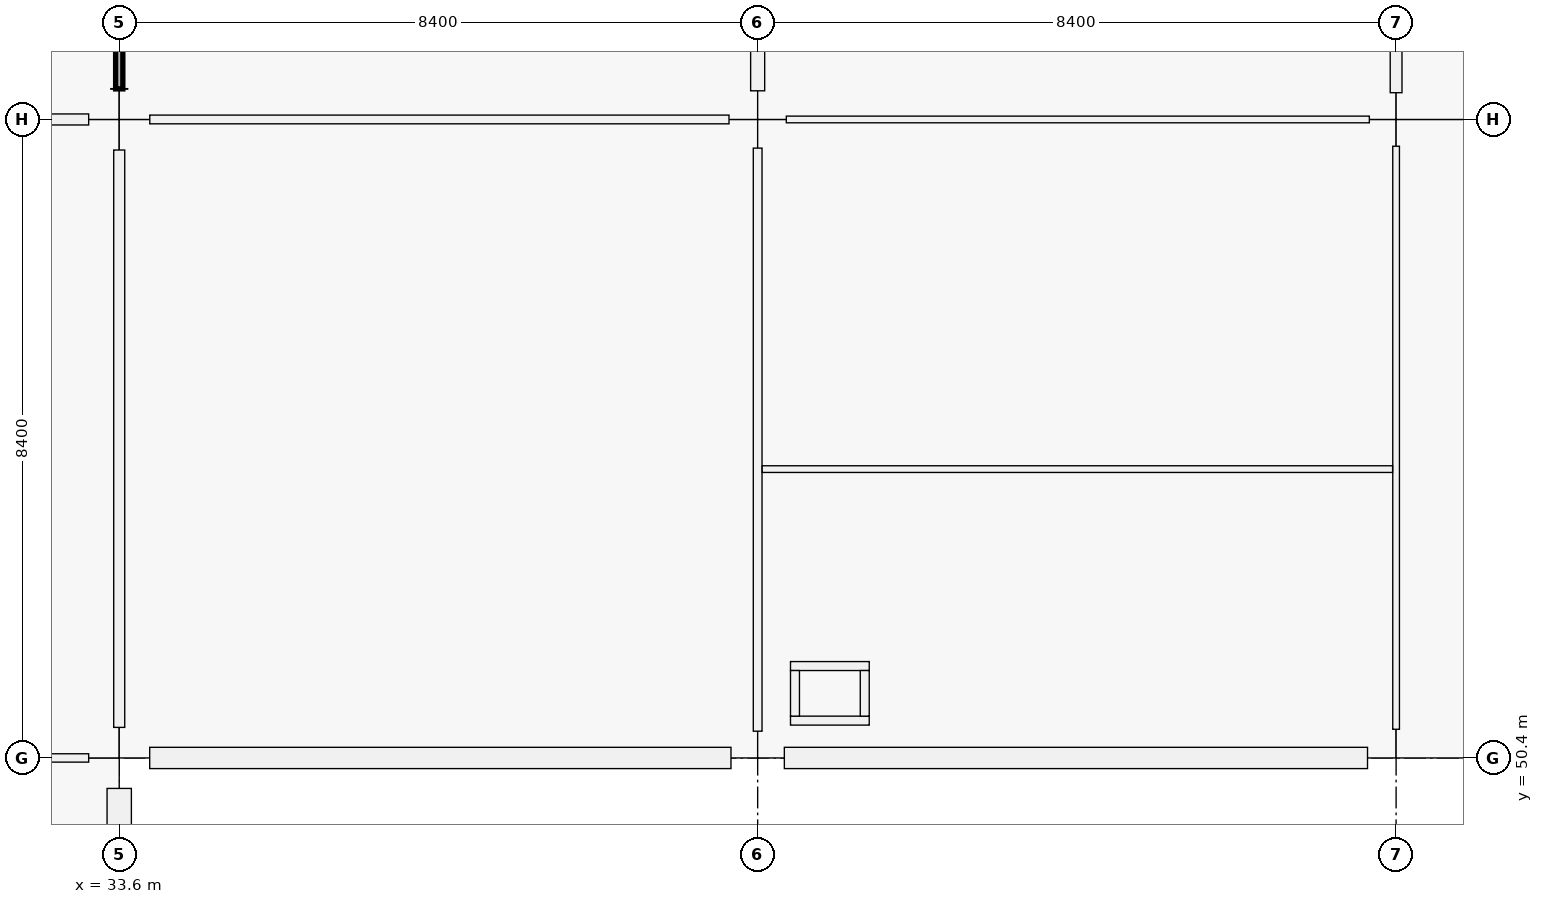
"""IFC4 building model, lengths in metres.
Left out: names, types, materials, properties, quantities, classifications, styles, units other than length and angle.
Written with IfcOpenShell. Run it as: python <this file> out.ifc"""

import sys

from ifc_helpers import new_model, si_unit, direction, frame, frame_2d, origin, origin_2d, place, context, subcontext, project, spatial, rectangle, extrude, element, fill, save


model = new_model("IFC4")
c1 = context("Model", 3, precision=1e-05, world=origin(), true_north=direction((0.0, 1.0)))
c2 = subcontext(c1, "Body", "Model", "MODEL_VIEW")
j1 = project(units=[si_unit("LENGTHUNIT", "METRE"), si_unit("PLANEANGLEUNIT", "RADIAN")], contexts=[c1])
p1 = place(None, origin())
s1 = spatial("IfcSite", under=j1, at=p1, CompositionType="ELEMENT")
p2 = place(p1, origin())
s2 = spatial("IfcBuilding", under=s1, at=p2, CompositionType="ELEMENT")
p3 = place(p2, frame((0.0, 0.0, 5.76)))
s3 = spatial("IfcBuildingStorey", under=s2, at=p3, CompositionType="ELEMENT", Elevation=5.76)
for number, where, z_axis, x_axis in (
    (1, (33.6, 50.4, 0.0), (0.0, 0.0, 1.0), (1.0, 0.0, 0.0)),
    (2, (33.6, 58.8, 0.0), (0.0, 0.0, 1.0), (1.0, 0.0, 0.0)),
):
    element("IfcColumn", number, at=place(p3, frame(where, z_axis=z_axis, x_axis=x_axis)), inside=s3, PredefinedType="COLUMN", context=c2, shape_type="SweptSolid", body=[
        extrude(rectangle(XDim=0.8, YDim=0.8, at=origin_2d()), origin(), (0.0, 0.0, 1.0), 4.5),
    ])
p4 = place(p3, frame((42.0, 50.4, 0.0), z_axis=(0.0, 0.0, 1.0), x_axis=(1.0, 0.0, 0.0)))
e3 = element("IfcColumn", 3, at=p4, inside=s3, PredefinedType="COLUMN", context=c2, shape_type="SweptSolid", body=[
    extrude(rectangle(XDim=0.7, YDim=0.7, at=origin_2d()), origin(), (0.0, 0.0, 1.0), 4.5),
])
for number, where, z_axis, x_axis in (
    (4, (42.0, 58.8, 0.0), (0.0, 0.0, 1.0), (1.0, 0.0, 0.0)),
    (5, (50.4, 50.4, 0.0), (0.0, 0.0, 1.0), (1.0, 0.0, 0.0)),
):
    element("IfcColumn", number, at=place(p3, frame(where, z_axis=z_axis, x_axis=x_axis)), inside=s3, PredefinedType="COLUMN", context=c2, shape_type="SweptSolid", body=[
        extrude(rectangle(XDim=0.75, YDim=0.75, at=origin_2d()), origin(), (0.0, 0.0, 1.0), 4.5),
    ])
p5 = place(p3, frame((50.4, 58.8, 0.0), z_axis=(0.0, 0.0, 1.0), x_axis=(1.0, 0.0, 0.0)))
e6 = element("IfcColumn", 6, at=p5, inside=s3, PredefinedType="COLUMN", context=c2, shape_type="SweptSolid", body=[
    extrude(rectangle(XDim=0.7, YDim=0.7, at=origin_2d()), origin(), (0.0, 0.0, 1.0), 4.5),
])
p6 = place(p3, frame((33.6, 49.999, 0.0), z_axis=(0.0, 0.0, 1.0), x_axis=(0.0, -1.0, 0.0)))
e7 = element("IfcWall", 7, at=p6, inside=s3, PredefinedType="SOLIDWALL", context=c2, shape_type="SweptSolid", body=[
    extrude(rectangle(XDim=7.598, YDim=0.32, at=frame_2d((3.799, 0.0))), origin(), (0.0, 0.0, 1.0), 3.4),
])
p7 = place(p6, frame((2.924, 0.0, 0.9)))
e8 = element("IfcOpeningElement", 8, at=p7, cuts=e7, PredefinedType="OPENING", context=c2, shape_type="SweptSolid", body=[
    extrude(rectangle(XDim=1.75, YDim=1.95, at=frame_2d((0.875, 0.975))), frame((0.0, 0.16, 0.0), z_axis=(0.0, -1.0, 0.0), x_axis=(1.0, 0.0, 0.0)), (0.0, 0.0, 1.0), 0.32),
])
p8 = place(p3, frame((41.649, 50.4, 0.0), z_axis=(0.0, 0.0, 1.0), x_axis=(-1.0, 0.0, 0.0)))
e9 = element("IfcWall", 9, at=p8, inside=s3, PredefinedType="SOLIDWALL", context=c2, shape_type="SweptSolid", body=[
    extrude(rectangle(XDim=7.648, YDim=0.28, at=frame_2d((3.824, 0.0))), origin(), (0.0, 0.0, 1.0), 3.4),
])
p9 = place(p3, frame((50.024, 50.4, 0.0), z_axis=(0.0, 0.0, 1.0), x_axis=(-1.0, 0.0, 0.0)))
e10 = element("IfcWall", 10, at=p9, inside=s3, PredefinedType="SOLIDWALL", context=c2, shape_type="SweptSolid", body=[
    extrude(rectangle(XDim=7.673, YDim=0.28, at=frame_2d((3.836, 0.0))), origin(), (0.0, 0.0, 1.0), 3.4),
])
p10 = place(p9, frame((2.462, 0.0, 0.9)))
e11 = element("IfcOpeningElement", 11, at=p10, cuts=e10, PredefinedType="OPENING", context=c2, shape_type="SweptSolid", body=[
    extrude(rectangle(XDim=2.75, YDim=1.6, at=frame_2d((1.375, 0.8))), frame((0.0, 0.14, 0.0), z_axis=(0.0, -1.0, 0.0), x_axis=(1.0, 0.0, 0.0)), (0.0, 0.0, 1.0), 0.28),
])
for number, where, z_axis, x_axis in (
    (12, (42.432, 50.891, 0.0), (0.0, 0.0, 1.0), (1.0, 0.0, 0.0)),
    (13, (42.432, 51.609, 0.0), (0.0, 0.0, 1.0), (1.0, 0.0, 0.0)),
):
    element("IfcWall", number, at=place(p3, frame(where, z_axis=z_axis, x_axis=x_axis)), inside=s3, PredefinedType="PARTITIONING", context=c2, shape_type="SweptSolid", body=[
        extrude(rectangle(XDim=1.036, YDim=0.118, at=frame_2d((0.518, 0.0))), origin(), (0.0, 0.0, 1.0), 3.48),
    ])
for number, where, z_axis, x_axis in (
    (14, (42.491, 50.95, 0.0), (0.0, 0.0, 1.0), (0.0, 1.0, 0.0)),
    (15, (43.409, 50.95, 0.0), (0.0, 0.0, 1.0), (0.0, 1.0, 0.0)),
):
    element("IfcWall", number, at=place(p3, frame(where, z_axis=z_axis, x_axis=x_axis)), inside=s3, PredefinedType="PARTITIONING", context=c2, shape_type="SweptSolid", body=[
        extrude(rectangle(XDim=0.6, YDim=0.118, at=frame_2d((0.3, 0.0))), origin(), (0.0, 0.0, 1.0), 3.48),
    ])
p11 = place(p3, frame((25.602, 50.4, 0.0), z_axis=(0.0, 0.0, 1.0), x_axis=(1.0, 0.0, 0.0)))
e16 = element("IfcWall", 16, at=p11, inside=s3, PredefinedType="MOVABLE", context=c2, shape_type="SweptSolid", body=[
    extrude(rectangle(XDim=7.596, YDim=0.11, at=frame_2d((3.798, 0.0))), origin(), (0.0, 0.0, 1.0), 2.4),
])
p12 = place(p11, frame((3.258, 0.0, 0.0)))
e17 = element("IfcOpeningElement", 17, at=p12, cuts=e16, PredefinedType="OPENING", context=c2, shape_type="SweptSolid", body=[
    extrude(rectangle(XDim=1.08, YDim=2.22, at=frame_2d((0.54, 1.11))), frame((0.0, 0.055, 0.0), z_axis=(0.0, -1.0, 0.0), x_axis=(1.0, 0.0, 0.0)), (0.0, 0.0, 1.0), 0.11),
])
p13 = place(p3, frame((25.602, 58.8, 0.0), z_axis=(0.0, 0.0, 1.0), x_axis=(1.0, 0.0, 0.0)))
e18 = element("IfcWall", 18, at=p13, inside=s3, PredefinedType="PARTITIONING", context=c2, shape_type="SweptSolid", body=[
    extrude(rectangle(XDim=7.596, YDim=0.145, at=frame_2d((3.798, 0.0))), origin(), (0.0, 0.0, 1.0), 2.4),
])
p14 = place(p13, frame((3.268, 0.0, 0.0)))
e19 = element("IfcOpeningElement", 19, at=p14, cuts=e18, PredefinedType="OPENING", context=c2, shape_type="SweptSolid", body=[
    extrude(rectangle(XDim=1.06, YDim=2.22, at=frame_2d((0.53, 1.11))), frame((0.0, 0.073, 0.0), z_axis=(0.0, -1.0, 0.0), x_axis=(1.0, 0.0, 0.0)), (0.0, 0.0, 1.0), 0.145),
])
p15 = place(p3, frame((34.002, 58.8, 0.0), z_axis=(0.0, 0.0, 1.0), x_axis=(1.0, 0.0, 0.0)))
e20 = element("IfcWall", 20, at=p15, inside=s3, PredefinedType="PARTITIONING", context=c2, shape_type="SweptSolid", body=[
    extrude(rectangle(XDim=7.621, YDim=0.115, at=frame_2d((3.811, 0.0))), origin(), (0.0, 0.0, 1.0), 2.4),
])
p16 = place(p15, frame((3.28, 0.0, 0.0)))
e21 = element("IfcOpeningElement", 21, at=p16, cuts=e20, PredefinedType="OPENING", context=c2, shape_type="SweptSolid", body=[
    extrude(rectangle(XDim=1.06, YDim=2.22, at=frame_2d((0.53, 1.11))), frame((0.0, 0.058, 0.0), z_axis=(0.0, -1.0, 0.0), x_axis=(1.0, 0.0, 0.0)), (0.0, 0.0, 1.0), 0.115),
])
p17 = place(p3, frame((42.377, 58.8, 0.0), z_axis=(0.0, 0.0, 1.0), x_axis=(1.0, 0.0, 0.0)))
e22 = element("IfcWall", 22, at=p17, inside=s3, PredefinedType="PARTITIONING", context=c2, shape_type="SweptSolid", body=[
    extrude(rectangle(XDim=7.671, YDim=0.088, at=frame_2d((3.835, 0.0))), origin(), (0.0, 0.0, 1.0), 2.4),
])
p18 = place(p3, frame((33.6, 50.802, 0.0), z_axis=(0.0, 0.0, 1.0), x_axis=(0.0, 1.0, 0.0)))
e23 = element("IfcWall", 23, at=p18, inside=s3, PredefinedType="PARTITIONING", context=c2, shape_type="SweptSolid", body=[
    extrude(rectangle(XDim=7.596, YDim=0.145, at=frame_2d((3.798, 0.0))), origin(), (0.0, 0.0, 1.0), 2.4),
])
p19 = place(p18, frame((3.318, 0.0, 0.0)))
e24 = element("IfcOpeningElement", 24, at=p19, cuts=e23, PredefinedType="OPENING", context=c2, shape_type="SweptSolid", body=[
    extrude(rectangle(XDim=0.96, YDim=2.18, at=frame_2d((0.48, 1.09))), frame((0.0, 0.073, 0.0), z_axis=(0.0, -1.0, 0.0), x_axis=(1.0, 0.0, 0.0)), (0.0, 0.0, 1.0), 0.145),
])
p20 = place(p3, frame((33.6, 59.202, 0.0), z_axis=(0.0, 0.0, 1.0), x_axis=(0.0, 1.0, 0.0)))
e25 = element("IfcWall", 25, at=p20, inside=s3, PredefinedType="PARTITIONING", context=c2, shape_type="SweptSolid", body=[
    extrude(rectangle(XDim=7.596, YDim=0.095, at=frame_2d((3.798, 0.0))), origin(), (0.0, 0.0, 1.0), 2.4),
])
p21 = place(p20, frame((3.308, 0.0, 0.0)))
e26 = element("IfcOpeningElement", 26, at=p21, cuts=e25, PredefinedType="OPENING", context=c2, shape_type="SweptSolid", body=[
    extrude(rectangle(XDim=0.98, YDim=2.18, at=frame_2d((0.49, 1.09))), frame((0.0, 0.047, 0.0), z_axis=(0.0, -1.0, 0.0), x_axis=(1.0, 0.0, 0.0)), (0.0, 0.0, 1.0), 0.095),
])
p22 = place(p3, frame((42.0, 50.752, 0.0), z_axis=(0.0, 0.0, 1.0), x_axis=(0.0, 1.0, 0.0)))
e27 = element("IfcWall", 27, at=p22, inside=s3, PredefinedType="PARTITIONING", context=c2, shape_type="SweptSolid", body=[
    extrude(rectangle(XDim=7.671, YDim=0.115, at=frame_2d((3.835, 0.0))), origin(), (0.0, 0.0, 1.0), 2.4),
])
p23 = place(p3, frame((42.0, 59.177, 0.0), z_axis=(0.0, 0.0, 1.0), x_axis=(0.0, 1.0, 0.0)))
e28 = element("IfcWall", 28, at=p23, inside=s3, PredefinedType="PARTITIONING", context=c2, shape_type="SweptSolid", body=[
    extrude(rectangle(XDim=7.621, YDim=0.185, at=frame_2d((3.811, 0.0))), origin(), (0.0, 0.0, 1.0), 2.4),
])
p24 = place(p3, frame((50.4, 50.777, 0.0), z_axis=(0.0, 0.0, 1.0), x_axis=(0.0, 1.0, 0.0)))
e29 = element("IfcWall", 29, at=p24, inside=s3, PredefinedType="PARTITIONING", context=c2, shape_type="SweptSolid", body=[
    extrude(rectangle(XDim=7.671, YDim=0.088, at=frame_2d((3.835, 0.0))), origin(), (0.0, 0.0, 1.0), 2.4),
])
p25 = place(p24, frame((1.193, 0.0, 0.0)))
e30 = element("IfcOpeningElement", 30, at=p25, cuts=e29, PredefinedType="OPENING", context=c2, shape_type="SweptSolid", body=[
    extrude(rectangle(XDim=0.94, YDim=2.15, at=frame_2d((0.47, 1.075))), frame((0.0, 0.044, 0.0), z_axis=(0.0, -1.0, 0.0), x_axis=(1.0, 0.0, 0.0)), (0.0, 0.0, 1.0), 0.088),
])
p26 = place(p24, frame((5.123, 0.0, 0.0)))
e31 = element("IfcOpeningElement", 31, at=p26, cuts=e29, PredefinedType="OPENING", context=c2, shape_type="SweptSolid", body=[
    extrude(rectangle(XDim=0.92, YDim=2.15, at=frame_2d((0.46, 1.075))), frame((0.0, 0.044, 0.0), z_axis=(0.0, -1.0, 0.0), x_axis=(1.0, 0.0, 0.0)), (0.0, 0.0, 1.0), 0.088),
])
p27 = place(p3, frame((50.4, 59.152, 0.0), z_axis=(0.0, 0.0, 1.0), x_axis=(0.0, 1.0, 0.0)))
e32 = element("IfcWall", 32, at=p27, inside=s3, PredefinedType="PARTITIONING", context=c2, shape_type="SweptSolid", body=[
    extrude(rectangle(XDim=7.646, YDim=0.155, at=frame_2d((3.823, 0.0))), origin(), (0.0, 0.0, 1.0), 2.4),
])
p28 = place(p27, frame((1.163, 0.0, 0.0)))
e33 = element("IfcOpeningElement", 33, at=p28, cuts=e32, PredefinedType="OPENING", context=c2, shape_type="SweptSolid", body=[
    extrude(rectangle(XDim=1.05, YDim=2.12, at=frame_2d((0.525, 1.06))), frame((0.0, 0.078, 0.0), z_axis=(0.0, -1.0, 0.0), x_axis=(1.0, 0.0, 0.0)), (0.0, 0.0, 1.0), 0.155),
])
p29 = place(p27, frame((5.103, 0.0, 0.0)))
e34 = element("IfcOpeningElement", 34, at=p29, cuts=e32, PredefinedType="OPENING", context=c2, shape_type="SweptSolid", body=[
    extrude(rectangle(XDim=1.01, YDim=2.12, at=frame_2d((0.505, 1.06))), frame((0.0, 0.078, 0.0), z_axis=(0.0, -1.0, 0.0), x_axis=(1.0, 0.0, 0.0)), (0.0, 0.0, 1.0), 0.155),
])
p30 = place(p3, frame((42.06, 54.2, 0.0), z_axis=(0.0, 0.0, 1.0), x_axis=(1.0, 0.0, 0.0)))
e35 = element("IfcWall", 35, at=p30, inside=s3, PredefinedType="PARTITIONING", context=c2, shape_type="SweptSolid", body=[
    extrude(rectangle(XDim=8.294, YDim=0.088, at=frame_2d((4.147, 0.0))), origin(), (0.0, 0.0, 1.0), 2.4),
])
p31 = place(p10, origin())
e36 = element("IfcWindow", 36, at=p31, inside=s3, PartitioningType="SINGLE_PANEL", PredefinedType="WINDOW", context=c2, shape_type="SweptSolid", body=[
    extrude(rectangle(XDim=2.75, YDim=1.6, at=frame_2d((1.375, 0.8))), frame((0.0, 0.03, 0.0), z_axis=(0.0, -1.0, 0.0), x_axis=(1.0, 0.0, 0.0)), (0.0, 0.0, 1.0), 0.06),
])
fill(e11, e36)
p32 = place(p25, origin())
e37 = element("IfcDoor", 37, at=p32, inside=s3, OperationType="SINGLE_SWING_RIGHT", PredefinedType="DOOR", context=c2, shape_type="SweptSolid", body=[
    extrude(rectangle(XDim=0.94, YDim=2.15, at=frame_2d((0.47, 1.075))), frame((0.0, 0.025, 0.0), z_axis=(0.0, -1.0, 0.0), x_axis=(1.0, 0.0, 0.0)), (0.0, 0.0, 1.0), 0.05),
])
fill(e30, e37)
p33 = place(p26, origin())
e38 = element("IfcDoor", 38, at=p33, inside=s3, OperationType="SINGLE_SWING_LEFT", PredefinedType="DOOR", context=c2, shape_type="SweptSolid", body=[
    extrude(rectangle(XDim=0.92, YDim=2.15, at=frame_2d((0.46, 1.075))), frame((0.0, 0.025, 0.0), z_axis=(0.0, -1.0, 0.0), x_axis=(1.0, 0.0, 0.0)), (0.0, 0.0, 1.0), 0.05),
])
fill(e31, e38)
p34 = place(p16, origin())
e39 = element("IfcDoor", 39, at=p34, inside=s3, OperationType="SINGLE_SWING_LEFT", PredefinedType="DOOR", context=c2, shape_type="SweptSolid", body=[
    extrude(rectangle(XDim=1.06, YDim=2.22, at=frame_2d((0.53, 1.11))), frame((0.0, 0.025, 0.0), z_axis=(0.0, -1.0, 0.0), x_axis=(1.0, 0.0, 0.0)), (0.0, 0.0, 1.0), 0.05),
])
fill(e21, e39)
p35 = place(p19, origin())
e40 = element("IfcDoor", 40, at=p35, inside=s3, OperationType="SINGLE_SWING_RIGHT", PredefinedType="DOOR", context=c2, shape_type="SweptSolid", body=[
    extrude(rectangle(XDim=0.96, YDim=2.18, at=frame_2d((0.48, 1.09))), frame((0.0, 0.025, 0.0), z_axis=(0.0, -1.0, 0.0), x_axis=(1.0, 0.0, 0.0)), (0.0, 0.0, 1.0), 0.05),
])
fill(e24, e40)
save(model, sys.argv[1])
